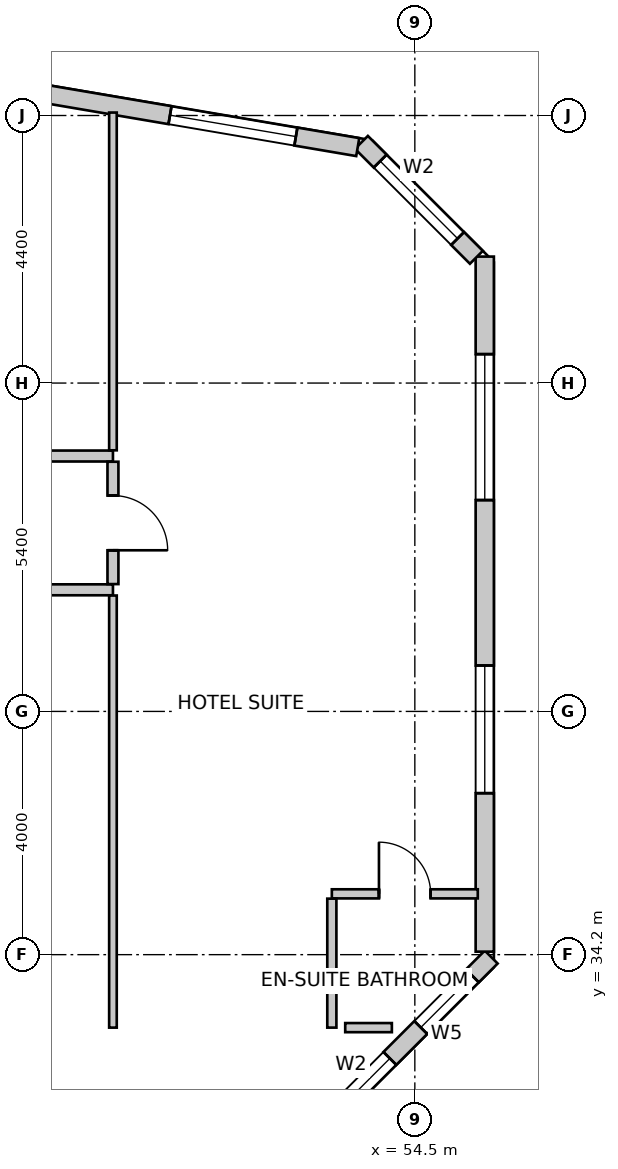
"""IFC4 building model, lengths in metres.
Left out: names, types, materials, properties, quantities, classifications, styles, units other than length and angle.
Written with IfcOpenShell. Run it as: python <this file> out.ifc"""

import sys

from ifc_helpers import new_model, si_unit, direction, frame, frame_2d, origin, place, context, subcontext, project, spatial, rectangle, extrude, source, transform, mapped, element, fill, save


model = new_model("IFC4")
c1 = context("Model", 3, precision=1e-05, world=origin(), true_north=direction((0.0, 1.0)))
c2 = subcontext(c1, "Body", "Model", "MODEL_VIEW")
j1 = project(units=[si_unit("LENGTHUNIT", "METRE"), si_unit("PLANEANGLEUNIT", "RADIAN")], contexts=[c1])
p1 = place(None, origin())
s1 = spatial("IfcSite", under=j1, at=p1, CompositionType="ELEMENT")
p2 = place(p1, origin())
s2 = spatial("IfcBuilding", under=s1, at=p2, CompositionType="ELEMENT")
p3 = place(p2, frame((0.0, 0.0, 157.4)))
s3 = spatial("IfcBuildingStorey", under=s2, at=p3, CompositionType="ELEMENT", Elevation=157.4)
p4 = place(p3, frame((52.476, 30.88, 0.0), z_axis=(0.0, 0.0, 1.0), x_axis=(0.707106781187, 0.707106781187, 0.0)))
e1 = element("IfcWall", 1, at=p4, inside=s3, PredefinedType="SOLIDWALL", context=c2, shape_type="SweptSolid", body=[
    extrude(rectangle(XDim=4.639, YDim=0.3, at=frame_2d((2.319, 0.0))), origin(), (0.0, 0.0, 1.0), 3.35),
])
m1 = source(origin(), c2, "Body", "SweptSolid", [
    extrude(rectangle(XDim=1.8, YDim=2.1, at=frame_2d((0.9, 1.05))), frame((0.0, 0.16, 0.0), z_axis=(0.0, -1.0, 0.0), x_axis=(1.0, 0.0, 0.0)), (0.0, 0.0, 1.0), 0.32),
])
p5 = place(p4, frame((0.482, 0.0, 0.85)))
e2 = element("IfcOpeningElement", 2, at=p5, cuts=e1, PredefinedType="OPENING", context=c2, shape_type="MappedRepresentation", body=[
    mapped(m1, transform((0.0, 0.0, 0.0), scale=1.0)),
])
m2 = source(origin(), c2, "Body", "SweptSolid", [
    extrude(rectangle(XDim=1.2, YDim=1.6, at=frame_2d((0.6, 0.8))), frame((0.0, 0.16, 0.0), z_axis=(0.0, -1.0, 0.0), x_axis=(1.0, 0.0, 0.0)), (0.0, 0.0, 1.0), 0.32),
])
p6 = place(p4, frame((3.001, 0.0, 0.85)))
e3 = element("IfcOpeningElement", 3, at=p6, cuts=e1, PredefinedType="OPENING", context=c2, shape_type="MappedRepresentation", body=[
    mapped(m2, transform((0.0, 0.0, 0.0), scale=1.0)),
])
p7 = place(p3, frame((55.65, 34.249, 0.0), z_axis=(0.0, 0.0, 1.0), x_axis=(0.0, 1.0, 0.0)))
e4 = element("IfcWall", 4, at=p7, inside=s3, PredefinedType="SOLIDWALL", context=c2, shape_type="SweptSolid", body=[
    extrude(rectangle(XDim=11.431, YDim=0.3, at=frame_2d((5.715, 0.0))), origin(), (0.0, 0.0, 1.0), 3.35),
])
m3 = source(origin(), c2, "Body", "SweptSolid", [
    extrude(rectangle(XDim=2.1, YDim=2.0, at=frame_2d((1.05, 1.0))), frame((0.0, 0.16, 0.0), z_axis=(0.0, -1.0, 0.0), x_axis=(1.0, 0.0, 0.0)), (0.0, 0.0, 1.0), 0.32),
])
p8 = place(p7, frame((2.606, 0.0, 0.85)))
e5 = element("IfcOpeningElement", 5, at=p8, cuts=e4, PredefinedType="OPENING", context=c2, shape_type="MappedRepresentation", body=[
    mapped(m3, transform((0.0, 0.0, 0.0), scale=1.0)),
])
m4 = source(origin(), c2, "Body", "SweptSolid", [
    extrude(rectangle(XDim=2.4, YDim=2.2, at=frame_2d((1.2, 1.1))), frame((0.0, 0.16, 0.0), z_axis=(0.0, -1.0, 0.0), x_axis=(1.0, 0.0, 0.0)), (0.0, 0.0, 1.0), 0.32),
])
p9 = place(p7, frame((7.426, 0.0, 0.85)))
e6 = element("IfcOpeningElement", 6, at=p9, cuts=e4, PredefinedType="OPENING", context=c2, shape_type="MappedRepresentation", body=[
    mapped(m4, transform((0.0, 0.0, 0.0), scale=1.0)),
])
p10 = place(p3, frame((55.512, 45.668, 0.0), z_axis=(0.0, 0.0, 1.0), x_axis=(-0.707152443695, 0.707061115729, 0.0)))
e7 = element("IfcWall", 7, at=p10, inside=s3, PredefinedType="SOLIDWALL", context=c2, shape_type="SweptSolid", body=[
    extrude(rectangle(XDim=2.673, YDim=0.3, at=frame_2d((1.337, 0.0))), origin(), (0.0, 0.0, 1.0), 3.35),
])
p11 = place(p10, frame((0.437, 0.0, 0.85)))
e8 = element("IfcOpeningElement", 8, at=p11, cuts=e7, PredefinedType="OPENING", context=c2, shape_type="MappedRepresentation", body=[
    mapped(m1, transform((0.0, 0.0, 0.0), scale=1.0)),
])
p12 = place(p3, frame((53.561, 47.48, 0.0), z_axis=(0.0, 0.0, 1.0), x_axis=(-0.985845173895, 0.167658262868, 0.0)))
e9 = element("IfcWall", 9, at=p12, inside=s3, PredefinedType="SOLIDWALL", context=c2, shape_type="SweptSolid", body=[
    extrude(rectangle(XDim=32.132, YDim=0.3, at=frame_2d((16.066, 0.0))), origin(), (0.0, 0.0, 1.0), 3.35),
])
p13 = place(p12, frame((1.032, 0.0, 0.85)))
e10 = element("IfcOpeningElement", 10, at=p13, cuts=e9, PredefinedType="OPENING", context=c2, shape_type="MappedRepresentation", body=[
    mapped(m3, transform((0.0, 0.0, 0.0), scale=1.0)),
])
p14 = place(p12, frame((5.787, 0.0, 0.85)))
e11 = element("IfcOpeningElement", 11, at=p14, cuts=e9, PredefinedType="OPENING", context=c2, shape_type="MappedRepresentation", body=[
    mapped(m3, transform((0.0, 0.0, 0.0), scale=1.0)),
])
m5 = source(origin(), c2, "Body", "SweptSolid", [
    extrude(rectangle(XDim=1.5, YDim=1.8, at=frame_2d((0.75, 0.9))), frame((0.0, 0.16, 0.0), z_axis=(0.0, -1.0, 0.0), x_axis=(1.0, 0.0, 0.0)), (0.0, 0.0, 1.0), 0.32),
])
p15 = place(p12, frame((10.078, 0.0, 0.85)))
e12 = element("IfcOpeningElement", 12, at=p15, cuts=e9, PredefinedType="OPENING", context=c2, shape_type="MappedRepresentation", body=[
    mapped(m5, transform((0.0, 0.0, 0.0), scale=1.0)),
])
p16 = place(p12, frame((13.768, 0.0, 0.85)))
e13 = element("IfcOpeningElement", 13, at=p16, cuts=e9, PredefinedType="OPENING", context=c2, shape_type="MappedRepresentation", body=[
    mapped(m3, transform((0.0, 0.0, 0.0), scale=1.0)),
])
p17 = place(p12, frame((18.039, 0.0, 0.85)))
e14 = element("IfcOpeningElement", 14, at=p17, cuts=e9, PredefinedType="OPENING", context=c2, shape_type="MappedRepresentation", body=[
    mapped(m5, transform((0.0, 0.0, 0.0), scale=1.0)),
])
p18 = place(p12, frame((20.459, 0.0, 0.85)))
e15 = element("IfcOpeningElement", 15, at=p18, cuts=e9, PredefinedType="OPENING", context=c2, shape_type="MappedRepresentation", body=[
    mapped(m3, transform((0.0, 0.0, 0.0), scale=1.0)),
])
p19 = place(p12, frame((25.55, 0.0, 0.85)))
e16 = element("IfcOpeningElement", 16, at=p19, cuts=e9, PredefinedType="OPENING", context=c2, shape_type="MappedRepresentation", body=[
    mapped(m3, transform((0.0, 0.0, 0.0), scale=1.0)),
])
m6 = source(origin(), c2, "Body", "SweptSolid", [
    extrude(rectangle(XDim=0.9, YDim=1.6, at=frame_2d((0.45, 0.8))), frame((0.0, 0.16, 0.0), z_axis=(0.0, -1.0, 0.0), x_axis=(1.0, 0.0, 0.0)), (0.0, 0.0, 1.0), 0.32),
])
p20 = place(p12, frame((30.65, 0.0, 0.85)))
e17 = element("IfcOpeningElement", 17, at=p20, cuts=e9, PredefinedType="OPENING", context=c2, shape_type="MappedRepresentation", body=[
    mapped(m6, transform((0.0, 0.0, 0.0), scale=1.0)),
])
p21 = place(p3, frame((41.829, 42.4, 0.0), z_axis=(0.0, 0.0, 1.0), x_axis=(1.0, 0.0, 0.0)))
e18 = element("IfcWall", 18, at=p21, inside=s3, PredefinedType="PARTITIONING", context=c2, shape_type="SweptSolid", body=[
    extrude(rectangle(XDim=7.706, YDim=0.18, at=frame_2d((3.853, 0.0))), origin(), (0.0, 0.0, 1.0), 2.788),
])
m7 = source(origin(), c2, "Body", "SweptSolid", [
    extrude(rectangle(XDim=0.9, YDim=2.15, at=frame_2d((0.45, 1.075))), frame((0.0, 0.1, 0.0), z_axis=(0.0, -1.0, 0.0), x_axis=(1.0, 0.0, 0.0)), (0.0, 0.0, 1.0), 0.2),
])
p22 = place(p21, frame((3.403, 0.0, 0.0)))
e19 = element("IfcOpeningElement", 19, at=p22, cuts=e18, PredefinedType="OPENING", context=c2, shape_type="MappedRepresentation", body=[
    mapped(m7, transform((0.0, 0.0, 0.0), scale=1.0)),
])
p23 = place(p3, frame((49.535, 40.2, 0.0), z_axis=(0.0, 0.0, 1.0), x_axis=(-1.0, 0.0, 0.0)))
e20 = element("IfcWall", 20, at=p23, inside=s3, PredefinedType="PARTITIONING", context=c2, shape_type="SweptSolid", body=[
    extrude(rectangle(XDim=7.706, YDim=0.18, at=frame_2d((3.853, 0.0))), origin(), (0.0, 0.0, 1.0), 2.788),
])
p24 = place(p23, frame((3.403, 0.0, 0.0)))
e21 = element("IfcOpeningElement", 21, at=p24, cuts=e20, PredefinedType="OPENING", context=c2, shape_type="MappedRepresentation", body=[
    mapped(m7, transform((0.0, 0.0, 0.0), scale=1.0)),
])
p25 = place(p3, frame((49.535, 42.306, 0.0), z_axis=(0.0, 0.0, 1.0), x_axis=(0.0, -1.0, 0.0)))
e22 = element("IfcWall", 22, at=p25, inside=s3, PredefinedType="PARTITIONING", context=c2, shape_type="SweptSolid", body=[
    extrude(rectangle(XDim=2.012, YDim=0.18, at=frame_2d((1.006, 0.0))), origin(), (0.0, 0.0, 1.0), 3.35),
])
p26 = place(p25, frame((0.556, 0.0, 0.0)))
e23 = element("IfcOpeningElement", 23, at=p26, cuts=e22, PredefinedType="OPENING", context=c2, shape_type="MappedRepresentation", body=[
    mapped(m7, transform((0.0, 0.0, 0.0), scale=1.0)),
])
p27 = place(p3, frame((49.535, 48.049, 0.0), z_axis=(0.0, 0.0, 1.0), x_axis=(0.0, -1.0, 0.0)))
e24 = element("IfcWall", 24, at=p27, inside=s3, PredefinedType="PARTITIONING", context=c2, shape_type="SweptSolid", body=[
    extrude(rectangle(XDim=5.555, YDim=0.125, at=frame_2d((2.777, 0.0))), origin(), (0.0, 0.0, 1.0), 3.35),
])
p28 = place(p3, frame((49.535, 40.106, 0.0), z_axis=(0.0, 0.0, 1.0), x_axis=(0.0, -1.0, 0.0)))
e25 = element("IfcWall", 25, at=p28, inside=s3, PredefinedType="PARTITIONING", context=c2, shape_type="SweptSolid", body=[
    extrude(rectangle(XDim=7.106, YDim=0.125, at=frame_2d((3.553, 0.0))), origin(), (0.0, 0.0, 1.0), 3.35),
])
p29 = place(p3, frame((53.135, 35.2, 0.0), z_axis=(0.0, 0.0, 1.0), x_axis=(1.0, 0.0, 0.0)))
e26 = element("IfcWall", 26, at=p29, inside=s3, PredefinedType="PARTITIONING", context=c2, shape_type="SweptSolid", body=[
    extrude(rectangle(XDim=2.4, YDim=0.15, at=frame_2d((1.2, 0.0))), origin(), (0.0, 0.0, 1.0), 3.35),
])
m8 = source(origin(), c2, "Body", "SweptSolid", [
    extrude(rectangle(XDim=0.85, YDim=2.15, at=frame_2d((0.425, 1.075))), frame((0.0, 0.085, 0.0), z_axis=(0.0, -1.0, 0.0), x_axis=(1.0, 0.0, 0.0)), (0.0, 0.0, 1.0), 0.17),
])
p30 = place(p29, frame((0.775, 0.0, 0.0)))
e27 = element("IfcOpeningElement", 27, at=p30, cuts=e26, PredefinedType="OPENING", context=c2, shape_type="MappedRepresentation", body=[
    mapped(m8, transform((0.0, 0.0, 0.0), scale=1.0)),
])
p31 = place(p3, frame((53.135, 33.0, 0.0), z_axis=(0.0, 0.0, 1.0), x_axis=(0.0, 1.0, 0.0)))
e28 = element("IfcWall", 28, at=p31, inside=s3, PredefinedType="PARTITIONING", context=c2, shape_type="SweptSolid", body=[
    extrude(rectangle(XDim=2.121, YDim=0.15, at=frame_2d((1.061, 0.0))), origin(), (0.0, 0.0, 1.0), 3.35),
])
p32 = place(p3, frame((54.122, 33.0, 0.0), z_axis=(0.0, 0.0, 1.0), x_axis=(-1.0, 0.0, 0.0)))
e29 = element("IfcWall", 29, at=p32, inside=s3, PredefinedType="PARTITIONING", context=c2, shape_type="SweptSolid", body=[
    extrude(rectangle(XDim=0.767, YDim=0.15, at=frame_2d((0.384, 0.0))), origin(), (0.0, 0.0, 1.0), 3.35),
])
m9 = source(origin(), c2, "Body", "SweptSolid", [
    extrude(rectangle(XDim=1.8, YDim=2.1, at=frame_2d((0.9, 1.05))), frame((0.0, -0.015, 0.0), z_axis=(0.0, -1.0, 0.0), x_axis=(1.0, 0.0, 0.0)), (0.0, 0.0, 1.0), 0.06),
])
p33 = place(p5, origin())
e30 = element("IfcWindow", 30, at=p33, inside=s3, PartitioningType="SINGLE_PANEL", PredefinedType="WINDOW", context=c2, shape_type="MappedRepresentation", body=[
    mapped(m9, transform((0.0, 0.0, 0.0), scale=1.0)),
])
fill(e2, e30)
m10 = source(origin(), c2, "Body", "SweptSolid", [
    extrude(rectangle(XDim=1.2, YDim=1.6, at=frame_2d((0.6, 0.8))), frame((0.0, -0.015, 0.0), z_axis=(0.0, -1.0, 0.0), x_axis=(1.0, 0.0, 0.0)), (0.0, 0.0, 1.0), 0.06),
])
p34 = place(p6, origin())
e31 = element("IfcWindow", 31, at=p34, inside=s3, PartitioningType="SINGLE_PANEL", PredefinedType="WINDOW", context=c2, shape_type="MappedRepresentation", body=[
    mapped(m10, transform((0.0, 0.0, 0.0), scale=1.0)),
])
fill(e3, e31)
m11 = source(origin(), c2, "Body", "SweptSolid", [
    extrude(rectangle(XDim=2.1, YDim=2.0, at=frame_2d((1.05, 1.0))), frame((0.0, -0.015, 0.0), z_axis=(0.0, -1.0, 0.0), x_axis=(1.0, 0.0, 0.0)), (0.0, 0.0, 1.0), 0.06),
])
p35 = place(p8, origin())
e32 = element("IfcWindow", 32, at=p35, inside=s3, PartitioningType="SINGLE_PANEL", PredefinedType="WINDOW", context=c2, shape_type="MappedRepresentation", body=[
    mapped(m11, transform((0.0, 0.0, 0.0), scale=1.0)),
])
fill(e5, e32)
m12 = source(origin(), c2, "Body", "SweptSolid", [
    extrude(rectangle(XDim=2.4, YDim=2.2, at=frame_2d((1.2, 1.1))), frame((0.0, -0.015, 0.0), z_axis=(0.0, -1.0, 0.0), x_axis=(1.0, 0.0, 0.0)), (0.0, 0.0, 1.0), 0.06),
])
p36 = place(p9, origin())
e33 = element("IfcWindow", 33, at=p36, inside=s3, PartitioningType="SINGLE_PANEL", PredefinedType="WINDOW", context=c2, shape_type="MappedRepresentation", body=[
    mapped(m12, transform((0.0, 0.0, 0.0), scale=1.0)),
])
fill(e6, e33)
p37 = place(p11, origin())
e34 = element("IfcWindow", 34, at=p37, inside=s3, PartitioningType="SINGLE_PANEL", PredefinedType="WINDOW", context=c2, shape_type="MappedRepresentation", body=[
    mapped(m9, transform((0.0, 0.0, 0.0), scale=1.0)),
])
fill(e8, e34)
p38 = place(p13, origin())
e35 = element("IfcWindow", 35, at=p38, inside=s3, PartitioningType="SINGLE_PANEL", PredefinedType="WINDOW", context=c2, shape_type="MappedRepresentation", body=[
    mapped(m11, transform((0.0, 0.0, 0.0), scale=1.0)),
])
fill(e10, e35)
m13 = source(origin(), c2, "Body", "SweptSolid", [
    extrude(rectangle(XDim=0.85, YDim=2.15, at=frame_2d((0.425, 1.075))), frame((0.0, 0.025, 0.0), z_axis=(0.0, -1.0, 0.0), x_axis=(1.0, 0.0, 0.0)), (0.0, 0.0, 1.0), 0.05),
])
p39 = place(p30, origin())
e36 = element("IfcDoor", 36, at=p39, inside=s3, OperationType="SINGLE_SWING_LEFT", PredefinedType="DOOR", context=c2, shape_type="MappedRepresentation", body=[
    mapped(m13, transform((0.0, 0.0, 0.0), scale=1.0)),
])
fill(e27, e36)
m14 = source(origin(), c2, "Body", "SweptSolid", [
    extrude(rectangle(XDim=0.9, YDim=2.15, at=frame_2d((0.45, 1.075))), frame((0.0, 0.025, 0.0), z_axis=(0.0, -1.0, 0.0), x_axis=(1.0, 0.0, 0.0)), (0.0, 0.0, 1.0), 0.05),
])
p40 = place(p26, origin())
e37 = element("IfcDoor", 37, at=p40, inside=s3, OperationType="SINGLE_SWING_RIGHT", PredefinedType="DOOR", context=c2, shape_type="MappedRepresentation", body=[
    mapped(m14, transform((0.0, 0.0, 0.0), scale=1.0)),
])
fill(e23, e37)
save(model, sys.argv[1])
